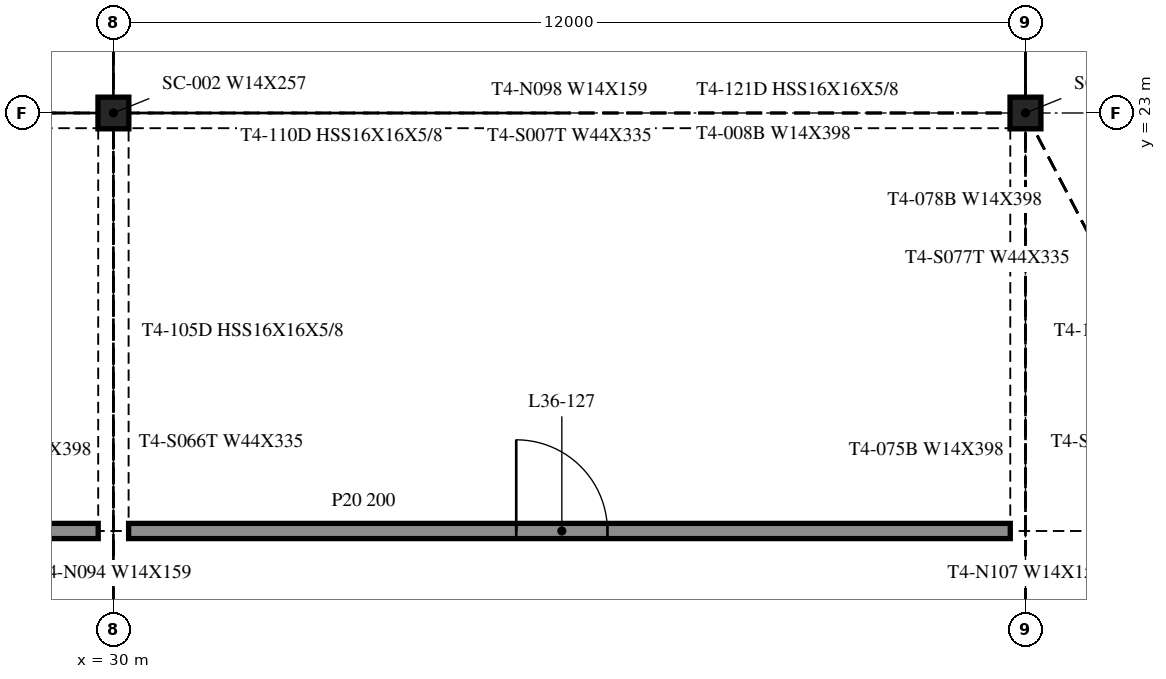
"""IFC4 building model, lengths in metres.
Left out: names, types, materials, properties, quantities, classifications, styles, units other than length and angle.
Written with IfcOpenShell. Run it as: python <this file> out.ifc"""

import sys

from ifc_helpers import new_model, si_unit, direction, frame, frame_2d, origin, origin_2d, place, context, subcontext, project, spatial, rectangle, i_section, extrude, element, fill, save


model = new_model("IFC4")
c1 = context("Model", 3, precision=1e-05, world=origin(), true_north=direction((0.0, 1.0)))
c2 = subcontext(c1, "Body", "Model", "MODEL_VIEW")
j1 = project(units=[si_unit("LENGTHUNIT", "METRE"), si_unit("PLANEANGLEUNIT", "RADIAN")], contexts=[c1])
p1 = place(None, origin())
s1 = spatial("IfcSite", under=j1, at=p1, CompositionType="ELEMENT")
p2 = place(p1, origin())
s2 = spatial("IfcBuilding", under=s1, at=p2, CompositionType="ELEMENT")
p3 = place(p2, frame((0.0, 0.0, 154.8)))
s3 = spatial("IfcBuildingStorey", under=s2, at=p3, CompositionType="ELEMENT", Elevation=154.8)
for number, where, z_axis, x_axis in (
    (1, (42.0, 23.0, -0.55), (0.0, 0.0, 1.0), (1.0, 0.0, 0.0)),
    (2, (30.0, 23.0, -0.55), (0.0, 0.0, 1.0), (1.0, 0.0, 0.0)),
):
    element("IfcColumn", number, at=place(p3, frame(where, z_axis=z_axis, x_axis=x_axis)), inside=s3, PredefinedType="COLUMN", context=c2, shape_type="SweptSolid", body=[
        extrude(i_section(OverallWidth=0.406, OverallDepth=0.417, WebThickness=0.03, FlangeThickness=0.048, at=origin_2d()), origin(), (0.0, 0.0, 1.0), 4.61),
    ])
p4 = place(p3, frame((18.2, 17.5, 0.0), z_axis=(0.0, 0.0, 1.0), x_axis=(1.0, 0.0, 0.0)))
e3 = element("IfcWall", 3, at=p4, inside=s3, PredefinedType="PARTITIONING", context=c2, shape_type="SweptSolid", body=[
    extrude(rectangle(XDim=11.6, YDim=0.2, at=frame_2d((5.8, 0.0))), origin(), (0.0, 0.0, 1.0), 4.06),
])
p5 = place(p4, frame((5.3, 0.0, 0.0)))
e4 = element("IfcOpeningElement", 4, at=p5, cuts=e3, PredefinedType="OPENING", context=c2, shape_type="SweptSolid", body=[
    extrude(rectangle(XDim=0.9, YDim=2.1, at=frame_2d((0.45, 1.05))), frame((0.0, 0.11, 0.0), z_axis=(0.0, -1.0, 0.0), x_axis=(1.0, 0.0, 0.0)), (0.0, 0.0, 1.0), 0.22),
])
p6 = place(p3, frame((30.2, 17.5, 0.0), z_axis=(0.0, 0.0, 1.0), x_axis=(1.0, 0.0, 0.0)))
e5 = element("IfcWall", 5, at=p6, inside=s3, PredefinedType="PARTITIONING", context=c2, shape_type="SweptSolid", body=[
    extrude(rectangle(XDim=11.6, YDim=0.2, at=frame_2d((5.8, 0.0))), origin(), (0.0, 0.0, 1.0), 4.06),
])
p7 = place(p6, frame((5.1, 0.0, 0.0)))
e6 = element("IfcOpeningElement", 6, at=p7, cuts=e5, PredefinedType="OPENING", context=c2, shape_type="SweptSolid", body=[
    extrude(rectangle(XDim=1.2, YDim=2.1, at=frame_2d((0.6, 1.05))), frame((0.0, 0.11, 0.0), z_axis=(0.0, -1.0, 0.0), x_axis=(1.0, 0.0, 0.0)), (0.0, 0.0, 1.0), 0.22),
])
p8 = place(p7, origin())
e7 = element("IfcDoor", 7, at=p8, inside=s3, OperationType="SINGLE_SWING_LEFT", PredefinedType="DOOR", context=c2, shape_type="SweptSolid", body=[
    extrude(rectangle(XDim=1.2, YDim=2.1, at=frame_2d((0.6, 1.05))), frame((0.0, 0.025, 0.0), z_axis=(0.0, -1.0, 0.0), x_axis=(1.0, 0.0, 0.0)), (0.0, 0.0, 1.0), 0.05),
])
fill(e6, e7)
save(model, sys.argv[1])
